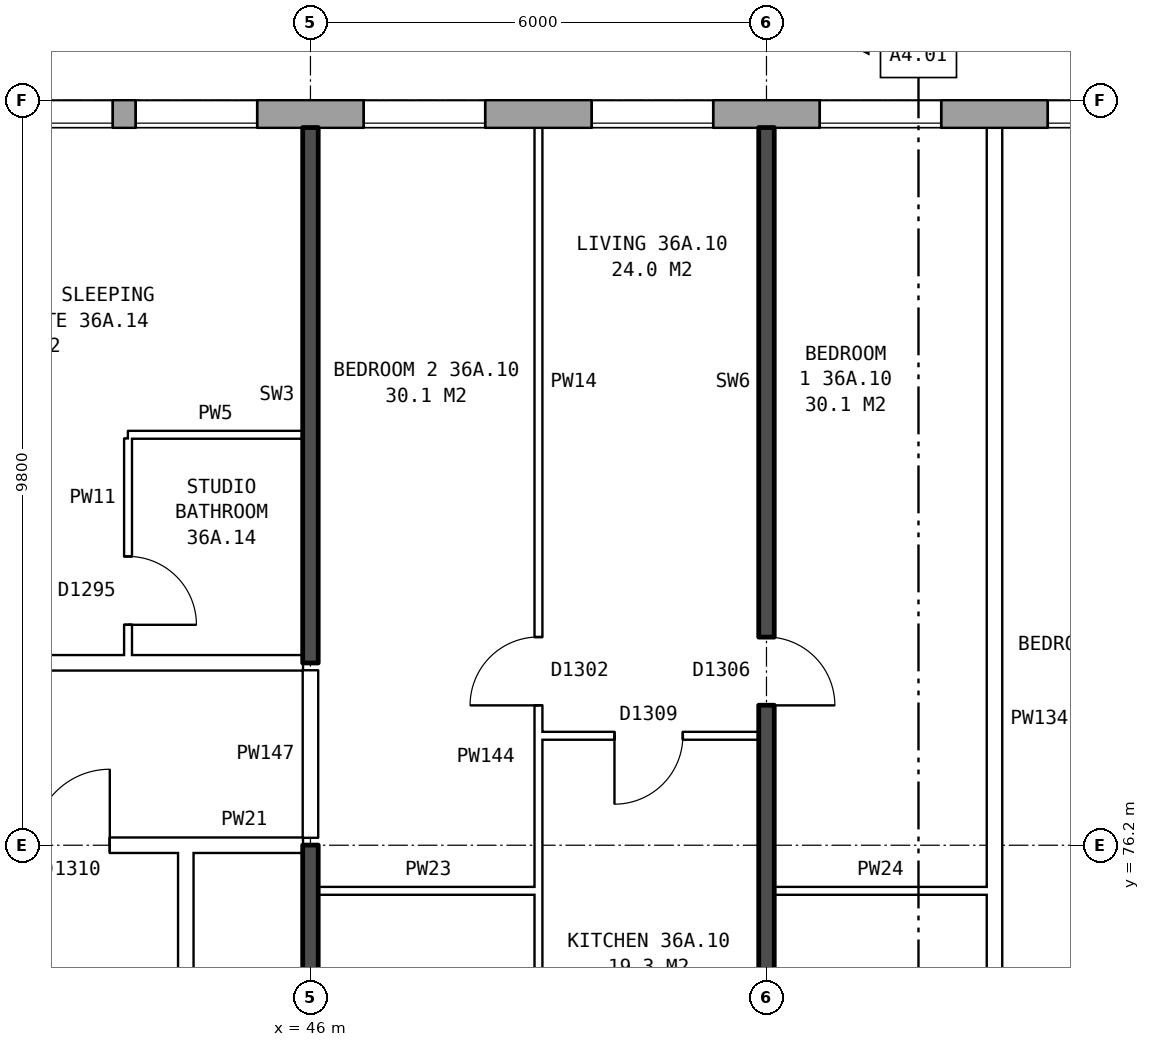
"""IFC4 building model, lengths in metres.
Left out: names, types, materials, properties, quantities, classifications, styles, units other than length and angle.
Written with IfcOpenShell. Run it as: python <this file> out.ifc"""

import sys

from ifc_helpers import new_model, si_unit, direction, frame, frame_2d, origin, place, context, subcontext, project, spatial, rectangle, extrude, element, fill, save


model = new_model("IFC4")
c1 = context("Model", 3, precision=1e-05, world=origin(), true_north=direction((0.0, 1.0)))
c2 = subcontext(c1, "Body", "Model", "MODEL_VIEW")
j1 = project(units=[si_unit("LENGTHUNIT", "METRE"), si_unit("PLANEANGLEUNIT", "RADIAN")], contexts=[c1])
p1 = place(None, origin())
s1 = spatial("IfcSite", under=j1, at=p1, CompositionType="ELEMENT")
p2 = place(p1, origin())
s2 = spatial("IfcBuilding", under=s1, at=p2, CompositionType="ELEMENT")
p3 = place(p2, frame((0.0, 0.0, 129.9)))
s3 = spatial("IfcBuildingStorey", under=s2, at=p3, CompositionType="ELEMENT", Elevation=129.9)
p4 = place(p3, frame((72.925, 85.82, 0.0), z_axis=(0.0, 0.0, 1.0), x_axis=(-1.0, 0.0, 0.0)))
e1 = element("IfcWall", 1, at=p4, inside=s3, PredefinedType="STANDARD", context=c2, shape_type="SweptSolid", body=[
    extrude(rectangle(XDim=43.101, YDim=0.36, at=frame_2d((21.55, 0.0))), origin(), (0.0, 0.0, 1.0), 2.85),
])
p5 = place(p4, frame((0.625, 0.0, 0.8)))
e2 = element("IfcOpeningElement", 2, at=p5, cuts=e1, PredefinedType="OPENING", context=c2, shape_type="SweptSolid", body=[
    extrude(rectangle(XDim=1.6, YDim=1.8, at=frame_2d((0.8, 0.9))), frame((0.0, 0.19, 0.0), z_axis=(0.0, -1.0, 0.0), x_axis=(1.0, 0.0, 0.0)), (0.0, 0.0, 1.0), 0.38),
])
p6 = place(p4, frame((3.625, 0.0, 0.8)))
e3 = element("IfcOpeningElement", 3, at=p6, cuts=e1, PredefinedType="OPENING", context=c2, shape_type="SweptSolid", body=[
    extrude(rectangle(XDim=1.6, YDim=1.8, at=frame_2d((0.8, 0.9))), frame((0.0, 0.19, 0.0), z_axis=(0.0, -1.0, 0.0), x_axis=(1.0, 0.0, 0.0)), (0.0, 0.0, 1.0), 0.38),
])
p7 = place(p4, frame((6.625, 0.0, 0.8)))
e4 = element("IfcOpeningElement", 4, at=p7, cuts=e1, PredefinedType="OPENING", context=c2, shape_type="SweptSolid", body=[
    extrude(rectangle(XDim=1.6, YDim=1.8, at=frame_2d((0.8, 0.9))), frame((0.0, 0.19, 0.0), z_axis=(0.0, -1.0, 0.0), x_axis=(1.0, 0.0, 0.0)), (0.0, 0.0, 1.0), 0.38),
])
p8 = place(p4, frame((10.175, 0.0, 0.15)))
e5 = element("IfcOpeningElement", 5, at=p8, cuts=e1, PredefinedType="OPENING", context=c2, shape_type="SweptSolid", body=[
    extrude(rectangle(XDim=0.6, YDim=0.9, at=frame_2d((0.3, 0.45))), frame((0.0, 0.19, 0.0), z_axis=(0.0, -1.0, 0.0), x_axis=(1.0, 0.0, 0.0)), (0.0, 0.0, 1.0), 0.38),
])
p9 = place(p4, frame((12.625, 0.0, 0.8)))
e6 = element("IfcOpeningElement", 6, at=p9, cuts=e1, PredefinedType="OPENING", context=c2, shape_type="SweptSolid", body=[
    extrude(rectangle(XDim=1.6, YDim=1.8, at=frame_2d((0.8, 0.9))), frame((0.0, 0.19, 0.0), z_axis=(0.0, -1.0, 0.0), x_axis=(1.0, 0.0, 0.0)), (0.0, 0.0, 1.0), 0.38),
])
p10 = place(p4, frame((15.625, 0.0, 0.8)))
e7 = element("IfcOpeningElement", 7, at=p10, cuts=e1, PredefinedType="OPENING", context=c2, shape_type="SweptSolid", body=[
    extrude(rectangle(XDim=1.6, YDim=1.8, at=frame_2d((0.8, 0.9))), frame((0.0, 0.19, 0.0), z_axis=(0.0, -1.0, 0.0), x_axis=(1.0, 0.0, 0.0)), (0.0, 0.0, 1.0), 0.38),
])
p11 = place(p4, frame((18.625, 0.0, 0.8)))
e8 = element("IfcOpeningElement", 8, at=p11, cuts=e1, PredefinedType="OPENING", context=c2, shape_type="SweptSolid", body=[
    extrude(rectangle(XDim=1.6, YDim=1.8, at=frame_2d((0.8, 0.9))), frame((0.0, 0.19, 0.0), z_axis=(0.0, -1.0, 0.0), x_axis=(1.0, 0.0, 0.0)), (0.0, 0.0, 1.0), 0.38),
])
p12 = place(p4, frame((21.625, 0.0, 0.8)))
e9 = element("IfcOpeningElement", 9, at=p12, cuts=e1, PredefinedType="OPENING", context=c2, shape_type="SweptSolid", body=[
    extrude(rectangle(XDim=1.6, YDim=1.8, at=frame_2d((0.8, 0.9))), frame((0.0, 0.19, 0.0), z_axis=(0.0, -1.0, 0.0), x_axis=(1.0, 0.0, 0.0)), (0.0, 0.0, 1.0), 0.38),
])
p13 = place(p4, frame((24.625, 0.0, 0.8)))
e10 = element("IfcOpeningElement", 10, at=p13, cuts=e1, PredefinedType="OPENING", context=c2, shape_type="SweptSolid", body=[
    extrude(rectangle(XDim=1.6, YDim=1.8, at=frame_2d((0.8, 0.9))), frame((0.0, 0.19, 0.0), z_axis=(0.0, -1.0, 0.0), x_axis=(1.0, 0.0, 0.0)), (0.0, 0.0, 1.0), 0.38),
])
p14 = place(p4, frame((27.625, 0.0, 0.8)))
e11 = element("IfcOpeningElement", 11, at=p14, cuts=e1, PredefinedType="OPENING", context=c2, shape_type="SweptSolid", body=[
    extrude(rectangle(XDim=1.6, YDim=1.8, at=frame_2d((0.8, 0.9))), frame((0.0, 0.19, 0.0), z_axis=(0.0, -1.0, 0.0), x_axis=(1.0, 0.0, 0.0)), (0.0, 0.0, 1.0), 0.38),
])
p15 = place(p4, frame((29.525, 0.0, 0.8)))
e12 = element("IfcOpeningElement", 12, at=p15, cuts=e1, PredefinedType="OPENING", context=c2, shape_type="SweptSolid", body=[
    extrude(rectangle(XDim=1.6, YDim=1.8, at=frame_2d((0.8, 0.9))), frame((0.0, 0.19, 0.0), z_axis=(0.0, -1.0, 0.0), x_axis=(1.0, 0.0, 0.0)), (0.0, 0.0, 1.0), 0.38),
])
p16 = place(p4, frame((33.375, 0.0, 1.7)))
e13 = element("IfcOpeningElement", 13, at=p16, cuts=e1, PredefinedType="OPENING", context=c2, shape_type="SweptSolid", body=[
    extrude(rectangle(XDim=0.8, YDim=0.9, at=frame_2d((0.4, 0.45))), frame((0.0, 0.19, 0.0), z_axis=(0.0, -1.0, 0.0), x_axis=(1.0, 0.0, 0.0)), (0.0, 0.0, 1.0), 0.38),
])
p17 = place(p4, frame((36.625, 0.0, 0.8)))
e14 = element("IfcOpeningElement", 14, at=p17, cuts=e1, PredefinedType="OPENING", context=c2, shape_type="SweptSolid", body=[
    extrude(rectangle(XDim=1.6, YDim=1.8, at=frame_2d((0.8, 0.9))), frame((0.0, 0.19, 0.0), z_axis=(0.0, -1.0, 0.0), x_axis=(1.0, 0.0, 0.0)), (0.0, 0.0, 1.0), 0.38),
])
p18 = place(p4, frame((39.625, 0.0, 0.8)))
e15 = element("IfcOpeningElement", 15, at=p18, cuts=e1, PredefinedType="OPENING", context=c2, shape_type="SweptSolid", body=[
    extrude(rectangle(XDim=1.6, YDim=1.8, at=frame_2d((0.8, 0.9))), frame((0.0, 0.19, 0.0), z_axis=(0.0, -1.0, 0.0), x_axis=(1.0, 0.0, 0.0)), (0.0, 0.0, 1.0), 0.38),
])
p19 = place(p4, frame((11.175, 0.0, 0.15)))
e16 = element("IfcOpeningElement", 16, at=p19, cuts=e1, PredefinedType="OPENING", context=c2, shape_type="SweptSolid", body=[
    extrude(rectangle(XDim=0.6, YDim=1.8, at=frame_2d((0.3, 0.9))), frame((0.0, 0.19, 0.0), z_axis=(0.0, -1.0, 0.0), x_axis=(1.0, 0.0, 0.0)), (0.0, 0.0, 1.0), 0.38),
])
p20 = place(p4, frame((31.425, 0.0, 0.8)))
e17 = element("IfcOpeningElement", 17, at=p20, cuts=e1, PredefinedType="OPENING", context=c2, shape_type="SweptSolid", body=[
    extrude(rectangle(XDim=0.8, YDim=0.9, at=frame_2d((0.4, 0.45))), frame((0.0, 0.19, 0.0), z_axis=(0.0, -1.0, 0.0), x_axis=(1.0, 0.0, 0.0)), (0.0, 0.0, 1.0), 0.38),
])
p21 = place(p4, frame((34.475, 0.0, 0.8)))
e18 = element("IfcOpeningElement", 18, at=p21, cuts=e1, PredefinedType="OPENING", context=c2, shape_type="SweptSolid", body=[
    extrude(rectangle(XDim=1.6, YDim=1.8, at=frame_2d((0.8, 0.9))), frame((0.0, 0.19, 0.0), z_axis=(0.0, -1.0, 0.0), x_axis=(1.0, 0.0, 0.0)), (0.0, 0.0, 1.0), 0.38),
])
p22 = place(p3, frame((44.36, 63.9, 0.0), z_axis=(0.0, 0.0, 1.0), x_axis=(0.0, 1.0, 0.0)))
e19 = element("IfcWall", 19, at=p22, inside=s3, PredefinedType="PARTITIONING", context=c2, shape_type="SweptSolid", body=[
    extrude(rectangle(XDim=12.2, YDim=0.2, at=frame_2d((6.1, 0.0))), origin(), (0.0, 0.0, 1.0), 2.85),
])
p23 = place(p22, frame((5.1, 0.0, 0.0)))
e20 = element("IfcOpeningElement", 20, at=p23, cuts=e19, PredefinedType="OPENING", context=c2, shape_type="SweptSolid", body=[
    extrude(rectangle(XDim=2.0, YDim=2.1, at=frame_2d((1.0, 1.05))), frame((0.0, 0.11, 0.0), z_axis=(0.0, -1.0, 0.0), x_axis=(1.0, 0.0, 0.0)), (0.0, 0.0, 1.0), 0.22),
])
p24 = place(p3, frame((46.1, 75.6, 0.0), z_axis=(0.0, 0.0, 1.0), x_axis=(1.0, 0.0, 0.0)))
e21 = element("IfcWall", 21, at=p24, inside=s3, PredefinedType="PARTITIONING", context=c2, shape_type="SweptSolid", body=[
    extrude(rectangle(XDim=2.9, YDim=0.1, at=frame_2d((1.45, 0.0))), origin(), (0.0, 0.0, 1.0), 2.85),
])
p25 = place(p3, frame((52.1, 75.6, 0.0), z_axis=(0.0, 0.0, 1.0), x_axis=(1.0, 0.0, 0.0)))
e22 = element("IfcWall", 22, at=p25, inside=s3, PredefinedType="PARTITIONING", context=c2, shape_type="SweptSolid", body=[
    extrude(rectangle(XDim=2.8, YDim=0.1, at=frame_2d((1.4, 0.0))), origin(), (0.0, 0.0, 1.0), 2.85),
])
p26 = place(p3, frame((41.36, 76.2, 0.0), z_axis=(0.0, 0.0, 1.0), x_axis=(1.0, 0.0, 0.0)))
e23 = element("IfcWall", 23, at=p26, inside=s3, PredefinedType="PARTITIONING", context=c2, shape_type="SweptSolid", body=[
    extrude(rectangle(XDim=3.0, YDim=0.2, at=frame_2d((1.5, 0.0))), origin(), (0.0, 0.0, 1.0), 2.85),
])
p27 = place(p26, frame((1.0, 0.0, 0.0)))
e24 = element("IfcOpeningElement", 24, at=p27, cuts=e23, PredefinedType="OPENING", context=c2, shape_type="SweptSolid", body=[
    extrude(rectangle(XDim=1.0, YDim=2.1, at=frame_2d((0.5, 1.05))), frame((0.0, 0.11, 0.0), z_axis=(0.0, -1.0, 0.0), x_axis=(1.0, 0.0, 0.0)), (0.0, 0.0, 1.0), 0.22),
])
p28 = place(p3, frame((44.36, 76.2, 0.0), z_axis=(0.0, 0.0, 1.0), x_axis=(1.0, 0.0, 0.0)))
e25 = element("IfcWall", 25, at=p28, inside=s3, PredefinedType="PARTITIONING", context=c2, shape_type="SweptSolid", body=[
    extrude(rectangle(XDim=1.54, YDim=0.2, at=frame_2d((0.77, 0.0))), origin(), (0.0, 0.0, 1.0), 2.85),
])
p29 = place(p3, frame((49.0, 77.64, 0.0), z_axis=(0.0, 0.0, 1.0), x_axis=(1.0, 0.0, 0.0)))
e26 = element("IfcWall", 26, at=p29, inside=s3, PredefinedType="PARTITIONING", context=c2, shape_type="SweptSolid", body=[
    extrude(rectangle(XDim=2.9, YDim=0.1, at=frame_2d((1.45, 0.0))), origin(), (0.0, 0.0, 1.0), 2.85),
])
p30 = place(p29, frame((1.0, 0.0, 0.0)))
e27 = element("IfcOpeningElement", 27, at=p30, cuts=e26, PredefinedType="OPENING", context=c2, shape_type="SweptSolid", body=[
    extrude(rectangle(XDim=0.9, YDim=2.1, at=frame_2d((0.45, 1.05))), frame((0.0, 0.06, 0.0), z_axis=(0.0, -1.0, 0.0), x_axis=(1.0, 0.0, 0.0)), (0.0, 0.0, 1.0), 0.12),
])
p31 = place(p3, frame((27.11, 78.6, 0.0), z_axis=(0.0, 0.0, 1.0), x_axis=(1.0, 0.0, 0.0)))
e28 = element("IfcWall", 28, at=p31, inside=s3, PredefinedType="PARTITIONING", context=c2, shape_type="SweptSolid", body=[
    extrude(rectangle(XDim=18.79, YDim=0.2, at=frame_2d((9.395, 0.0))), origin(), (0.0, 0.0, 1.0), 2.85),
])
p32 = place(p31, frame((14.19, 0.0, 0.0)))
e29 = element("IfcOpeningElement", 29, at=p32, cuts=e28, PredefinedType="OPENING", context=c2, shape_type="SweptSolid", body=[
    extrude(rectangle(XDim=1.0, YDim=2.1, at=frame_2d((0.5, 1.05))), frame((0.0, 0.11, 0.0), z_axis=(0.0, -1.0, 0.0), x_axis=(1.0, 0.0, 0.0)), (0.0, 0.0, 1.0), 0.22),
])
p33 = place(p31, frame((10.39, 0.0, 0.0)))
e30 = element("IfcOpeningElement", 30, at=p33, cuts=e28, PredefinedType="OPENING", context=c2, shape_type="SweptSolid", body=[
    extrude(rectangle(XDim=1.0, YDim=2.1, at=frame_2d((0.5, 1.05))), frame((0.0, 0.11, 0.0), z_axis=(0.0, -1.0, 0.0), x_axis=(1.0, 0.0, 0.0)), (0.0, 0.0, 1.0), 0.22),
])
p34 = place(p31, frame((4.59, 0.0, 0.0)))
e31 = element("IfcOpeningElement", 31, at=p34, cuts=e28, PredefinedType="OPENING", context=c2, shape_type="SweptSolid", body=[
    extrude(rectangle(XDim=1.0, YDim=2.1, at=frame_2d((0.5, 1.05))), frame((0.0, 0.11, 0.0), z_axis=(0.0, -1.0, 0.0), x_axis=(1.0, 0.0, 0.0)), (0.0, 0.0, 1.0), 0.22),
])
p35 = place(p3, frame((43.6, 81.6, 0.0), z_axis=(0.0, 0.0, 1.0), x_axis=(1.0, 0.0, 0.0)))
e32 = element("IfcWall", 32, at=p35, inside=s3, PredefinedType="PARTITIONING", context=c2, shape_type="SweptSolid", body=[
    extrude(rectangle(XDim=2.3, YDim=0.1, at=frame_2d((1.15, 0.0))), origin(), (0.0, 0.0, 1.0), 2.85),
])
p36 = place(p3, frame((43.6, 78.7, 0.0), z_axis=(0.0, 0.0, 1.0), x_axis=(0.0, 1.0, 0.0)))
e33 = element("IfcWall", 33, at=p36, inside=s3, PredefinedType="PARTITIONING", context=c2, shape_type="SweptSolid", body=[
    extrude(rectangle(XDim=2.85, YDim=0.1, at=frame_2d((1.425, 0.0))), origin(), (0.0, 0.0, 1.0), 2.85),
])
p37 = place(p36, frame((0.4, 0.0, 0.0)))
e34 = element("IfcOpeningElement", 34, at=p37, cuts=e33, PredefinedType="OPENING", context=c2, shape_type="SweptSolid", body=[
    extrude(rectangle(XDim=0.9, YDim=2.1, at=frame_2d((0.45, 1.05))), frame((0.0, 0.06, 0.0), z_axis=(0.0, -1.0, 0.0), x_axis=(1.0, 0.0, 0.0)), (0.0, 0.0, 1.0), 0.12),
])
p38 = place(p3, frame((46.0, 71.2, 0.0), z_axis=(0.0, 0.0, 1.0), x_axis=(0.0, 1.0, 0.0)))
e35 = element("IfcWall", 35, at=p38, inside=s3, PredefinedType="SOLIDWALL", context=c2, shape_type="SweptSolid", body=[
    extrude(rectangle(XDim=5.0, YDim=0.2, at=frame_2d((2.5, 0.0))), origin(), (0.0, 0.0, 1.0), 2.85),
])
p39 = place(p3, frame((46.0, 76.3, 0.0), z_axis=(0.0, 0.0, 1.0), x_axis=(0.0, 1.0, 0.0)))
e36 = element("IfcWall", 36, at=p39, inside=s3, PredefinedType="PARTITIONING", context=c2, shape_type="SweptSolid", body=[
    extrude(rectangle(XDim=2.2, YDim=0.2, at=frame_2d((1.1, 0.0))), origin(), (0.0, 0.0, 1.0), 2.85),
])
p40 = place(p3, frame((46.0, 78.6, 0.0), z_axis=(0.0, 0.0, 1.0), x_axis=(0.0, 1.0, 0.0)))
e37 = element("IfcWall", 37, at=p40, inside=s3, PredefinedType="SOLIDWALL", context=c2, shape_type="SweptSolid", body=[
    extrude(rectangle(XDim=7.04, YDim=0.2, at=frame_2d((3.52, 0.0))), origin(), (0.0, 0.0, 1.0), 2.85),
])
p41 = place(p3, frame((49.0, 71.3, 0.0), z_axis=(0.0, 0.0, 1.0), x_axis=(0.0, 1.0, 0.0)))
e38 = element("IfcWall", 38, at=p41, inside=s3, PredefinedType="PARTITIONING", context=c2, shape_type="SweptSolid", body=[
    extrude(rectangle(XDim=14.34, YDim=0.1, at=frame_2d((7.17, 0.0))), origin(), (0.0, 0.0, 1.0), 2.85),
])
p42 = place(p41, frame((6.74, 0.0, 0.0)))
e39 = element("IfcOpeningElement", 39, at=p42, cuts=e38, PredefinedType="OPENING", context=c2, shape_type="SweptSolid", body=[
    extrude(rectangle(XDim=0.9, YDim=2.1, at=frame_2d((0.45, 1.05))), frame((0.0, 0.06, 0.0), z_axis=(0.0, -1.0, 0.0), x_axis=(1.0, 0.0, 0.0)), (0.0, 0.0, 1.0), 0.12),
])
p43 = place(p41, frame((0.4, 0.0, 0.0)))
e40 = element("IfcOpeningElement", 40, at=p43, cuts=e38, PredefinedType="OPENING", context=c2, shape_type="SweptSolid", body=[
    extrude(rectangle(XDim=0.9, YDim=2.1, at=frame_2d((0.45, 1.05))), frame((0.0, 0.06, 0.0), z_axis=(0.0, -1.0, 0.0), x_axis=(1.0, 0.0, 0.0)), (0.0, 0.0, 1.0), 0.12),
])
p44 = place(p3, frame((52.0, 71.2, 0.0), z_axis=(0.0, 0.0, 1.0), x_axis=(0.0, 1.0, 0.0)))
e41 = element("IfcWall", 41, at=p44, inside=s3, PredefinedType="SOLIDWALL", context=c2, shape_type="SweptSolid", body=[
    extrude(rectangle(XDim=14.44, YDim=0.2, at=frame_2d((7.22, 0.0))), origin(), (0.0, 0.0, 1.0), 2.85),
])
p45 = place(p44, frame((6.84, 0.0, 0.0)))
e42 = element("IfcOpeningElement", 42, at=p45, cuts=e41, PredefinedType="OPENING", context=c2, shape_type="SweptSolid", body=[
    extrude(rectangle(XDim=0.9, YDim=2.1, at=frame_2d((0.45, 1.05))), frame((0.0, 0.11, 0.0), z_axis=(0.0, -1.0, 0.0), x_axis=(1.0, 0.0, 0.0)), (0.0, 0.0, 1.0), 0.22),
])
p46 = place(p44, frame((0.4, 0.0, 0.0)))
e43 = element("IfcOpeningElement", 43, at=p46, cuts=e41, PredefinedType="OPENING", context=c2, shape_type="SweptSolid", body=[
    extrude(rectangle(XDim=0.9, YDim=2.1, at=frame_2d((0.45, 1.05))), frame((0.0, 0.11, 0.0), z_axis=(0.0, -1.0, 0.0), x_axis=(1.0, 0.0, 0.0)), (0.0, 0.0, 1.0), 0.22),
])
p47 = place(p3, frame((55.0, 71.3, 0.0), z_axis=(0.0, 0.0, 1.0), x_axis=(0.0, 1.0, 0.0)))
e44 = element("IfcWall", 44, at=p47, inside=s3, PredefinedType="PARTITIONING", context=c2, shape_type="SweptSolid", body=[
    extrude(rectangle(XDim=14.34, YDim=0.2, at=frame_2d((7.17, 0.0))), origin(), (0.0, 0.0, 1.0), 2.85),
])
p48 = place(p10, origin())
e45 = element("IfcWindow", 45, at=p48, inside=s3, PartitioningType="SINGLE_PANEL", PredefinedType="WINDOW", context=c2, shape_type="SweptSolid", body=[
    extrude(rectangle(XDim=1.6, YDim=1.8, at=frame_2d((0.8, 0.9))), frame((0.0, 0.15, 0.0), z_axis=(0.0, -1.0, 0.0), x_axis=(1.0, 0.0, 0.0)), (0.0, 0.0, 1.0), 0.06),
])
fill(e7, e45)
p49 = place(p11, origin())
e46 = element("IfcWindow", 46, at=p49, inside=s3, PartitioningType="SINGLE_PANEL", PredefinedType="WINDOW", context=c2, shape_type="SweptSolid", body=[
    extrude(rectangle(XDim=1.6, YDim=1.8, at=frame_2d((0.8, 0.9))), frame((0.0, 0.15, 0.0), z_axis=(0.0, -1.0, 0.0), x_axis=(1.0, 0.0, 0.0)), (0.0, 0.0, 1.0), 0.06),
])
fill(e8, e46)
p50 = place(p12, origin())
e47 = element("IfcWindow", 47, at=p50, inside=s3, PartitioningType="SINGLE_PANEL", PredefinedType="WINDOW", context=c2, shape_type="SweptSolid", body=[
    extrude(rectangle(XDim=1.6, YDim=1.8, at=frame_2d((0.8, 0.9))), frame((0.0, 0.15, 0.0), z_axis=(0.0, -1.0, 0.0), x_axis=(1.0, 0.0, 0.0)), (0.0, 0.0, 1.0), 0.06),
])
fill(e9, e47)
p51 = place(p13, origin())
e48 = element("IfcWindow", 48, at=p51, inside=s3, PartitioningType="SINGLE_PANEL", PredefinedType="WINDOW", context=c2, shape_type="SweptSolid", body=[
    extrude(rectangle(XDim=1.6, YDim=1.8, at=frame_2d((0.8, 0.9))), frame((0.0, 0.15, 0.0), z_axis=(0.0, -1.0, 0.0), x_axis=(1.0, 0.0, 0.0)), (0.0, 0.0, 1.0), 0.06),
])
fill(e10, e48)
p52 = place(p14, origin())
e49 = element("IfcWindow", 49, at=p52, inside=s3, PartitioningType="SINGLE_PANEL", PredefinedType="WINDOW", context=c2, shape_type="SweptSolid", body=[
    extrude(rectangle(XDim=1.6, YDim=1.8, at=frame_2d((0.8, 0.9))), frame((0.0, 0.15, 0.0), z_axis=(0.0, -1.0, 0.0), x_axis=(1.0, 0.0, 0.0)), (0.0, 0.0, 1.0), 0.06),
])
fill(e11, e49)
p53 = place(p15, origin())
e50 = element("IfcWindow", 50, at=p53, inside=s3, PartitioningType="SINGLE_PANEL", PredefinedType="WINDOW", context=c2, shape_type="SweptSolid", body=[
    extrude(rectangle(XDim=1.6, YDim=1.8, at=frame_2d((0.8, 0.9))), frame((0.0, 0.15, 0.0), z_axis=(0.0, -1.0, 0.0), x_axis=(1.0, 0.0, 0.0)), (0.0, 0.0, 1.0), 0.06),
])
fill(e12, e50)
p54 = place(p27, origin())
e51 = element("IfcDoor", 51, at=p54, inside=s3, OperationType="SINGLE_SWING_RIGHT", PredefinedType="DOOR", context=c2, shape_type="SweptSolid", body=[
    extrude(rectangle(XDim=1.0, YDim=2.1, at=frame_2d((0.5, 1.05))), frame((0.0, 0.025, 0.0), z_axis=(0.0, -1.0, 0.0), x_axis=(1.0, 0.0, 0.0)), (0.0, 0.0, 1.0), 0.05),
])
fill(e24, e51)
p55 = place(p45, frame((0.9, 0.0, 0.0), z_axis=(0.0, 0.0, 1.0), x_axis=(-1.0, 0.0, 0.0)))
e52 = element("IfcDoor", 52, at=p55, inside=s3, OperationType="SINGLE_SWING_RIGHT", PredefinedType="DOOR", context=c2, shape_type="SweptSolid", body=[
    extrude(rectangle(XDim=0.9, YDim=2.1, at=frame_2d((0.45, 1.05))), frame((0.0, 0.025, 0.0), z_axis=(0.0, -1.0, 0.0), x_axis=(1.0, 0.0, 0.0)), (0.0, 0.0, 1.0), 0.05),
])
fill(e42, e52)
p56 = place(p42, origin())
e53 = element("IfcDoor", 53, at=p56, inside=s3, OperationType="SINGLE_SWING_LEFT", PredefinedType="DOOR", context=c2, shape_type="SweptSolid", body=[
    extrude(rectangle(XDim=0.9, YDim=2.1, at=frame_2d((0.45, 1.05))), frame((0.0, 0.025, 0.0), z_axis=(0.0, -1.0, 0.0), x_axis=(1.0, 0.0, 0.0)), (0.0, 0.0, 1.0), 0.05),
])
fill(e39, e53)
p57 = place(p30, frame((0.9, 0.0, 0.0), z_axis=(0.0, 0.0, 1.0), x_axis=(-1.0, 0.0, 0.0)))
e54 = element("IfcDoor", 54, at=p57, inside=s3, OperationType="SINGLE_SWING_RIGHT", PredefinedType="DOOR", context=c2, shape_type="SweptSolid", body=[
    extrude(rectangle(XDim=0.9, YDim=2.1, at=frame_2d((0.45, 1.05))), frame((0.0, 0.025, 0.0), z_axis=(0.0, -1.0, 0.0), x_axis=(1.0, 0.0, 0.0)), (0.0, 0.0, 1.0), 0.05),
])
fill(e27, e54)
p58 = place(p37, frame((0.9, 0.0, 0.0), z_axis=(0.0, 0.0, 1.0), x_axis=(-1.0, 0.0, 0.0)))
e55 = element("IfcDoor", 55, at=p58, inside=s3, OperationType="SINGLE_SWING_RIGHT", PredefinedType="DOOR", context=c2, shape_type="SweptSolid", body=[
    extrude(rectangle(XDim=0.9, YDim=2.1, at=frame_2d((0.45, 1.05))), frame((0.0, 0.025, 0.0), z_axis=(0.0, -1.0, 0.0), x_axis=(1.0, 0.0, 0.0)), (0.0, 0.0, 1.0), 0.05),
])
fill(e34, e55)
save(model, sys.argv[1])
